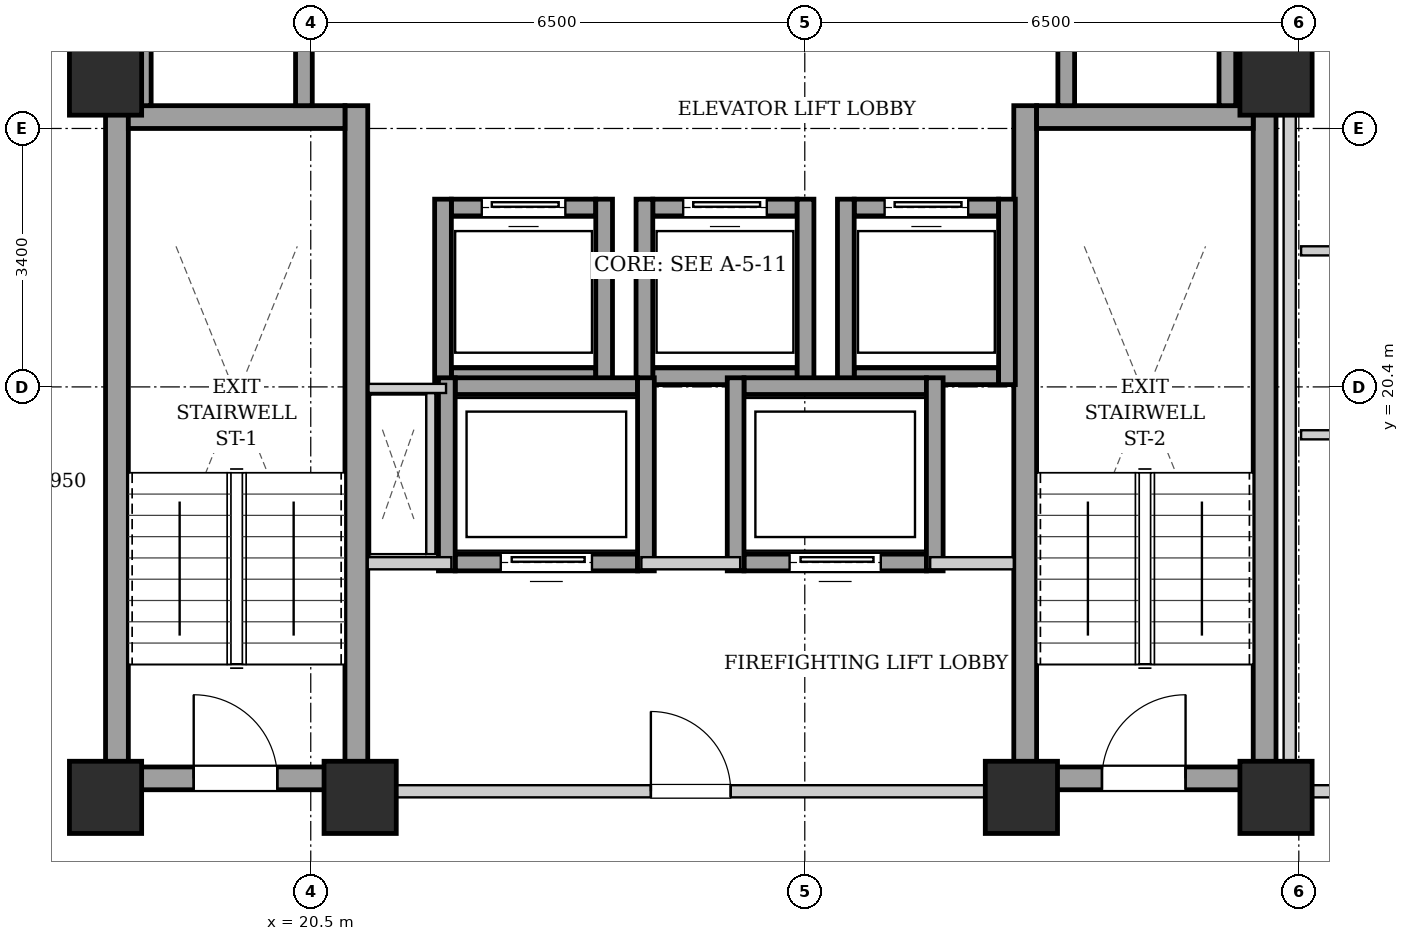
"""IFC4 building model, lengths in metres.
Left out: names, types, materials, properties, quantities, classifications, styles, units other than length and angle.
Written with IfcOpenShell. Run it as: python <this file> out.ifc"""

import sys

from ifc_helpers import new_model, si_unit, direction, frame, frame_2d, origin, origin_2d, place, context, subcontext, project, spatial, rectangle, extrude, element, fill, save


model = new_model("IFC4")
c1 = context("Model", 3, precision=1e-05, world=origin(), true_north=direction((0.0, 1.0)))
c2 = subcontext(c1, "Body", "Model", "MODEL_VIEW")
j1 = project(units=[si_unit("LENGTHUNIT", "METRE"), si_unit("PLANEANGLEUNIT", "RADIAN")], contexts=[c1])
p1 = place(None, origin())
s1 = spatial("IfcSite", under=j1, at=p1, CompositionType="ELEMENT")
p2 = place(p1, origin())
s2 = spatial("IfcBuilding", under=s1, at=p2, CompositionType="ELEMENT")
p3 = place(p2, frame((0.0, 0.0, 130.9)))
s3 = spatial("IfcBuildingStorey", under=s2, at=p3, CompositionType="ELEMENT", Elevation=130.9)
for number, where, z_axis, x_axis in (
    (1, (17.8, 15.0, 0.0), (0.0, 0.0, 1.0), (1.0, 0.0, 0.0)),
    (2, (21.15, 15.0, 0.0), (0.0, 0.0, 1.0), (1.0, 0.0, 0.0)),
    (3, (29.85, 15.0, 0.0), (0.0, 0.0, 1.0), (1.0, 0.0, 0.0)),
    (4, (33.2, 15.0, 0.0), (0.0, 0.0, 1.0), (1.0, 0.0, 0.0)),
    (5, (17.8, 24.45, 0.0), (0.0, 0.0, 1.0), (1.0, 0.0, 0.0)),
    (6, (33.2, 24.45, 0.0), (0.0, 0.0, 1.0), (1.0, 0.0, 0.0)),
):
    element("IfcColumn", number, at=place(p3, frame(where, z_axis=z_axis, x_axis=x_axis)), inside=s3, PredefinedType="COLUMN", context=c2, shape_type="SweptSolid", body=[
        extrude(rectangle(XDim=0.95, YDim=0.95, at=origin_2d()), origin(), (0.0, 0.0, 1.0), 3.25),
    ])
for number, where, z_axis, x_axis in (
    (7, (17.95, 15.1, 0.0), (0.0, 0.0, 1.0), (0.0, 1.0, 0.0)),
    (8, (21.1, 15.1, 0.0), (0.0, 0.0, 1.0), (0.0, 1.0, 0.0)),
):
    element("IfcWall", number, at=place(p3, frame(where, z_axis=z_axis, x_axis=x_axis)), inside=s3, PredefinedType="SHEAR", context=c2, shape_type="SweptSolid", body=[
        extrude(rectangle(XDim=9.0, YDim=0.3, at=frame_2d((4.5, 0.0))), origin(), (0.0, 0.0, 1.0), 2.99),
    ])
p4 = place(p3, frame((18.1, 23.95, 0.0), z_axis=(0.0, 0.0, 1.0), x_axis=(1.0, 0.0, 0.0)))
e9 = element("IfcWall", 9, at=p4, inside=s3, PredefinedType="SHEAR", context=c2, shape_type="SweptSolid", body=[
    extrude(rectangle(XDim=2.85, YDim=0.3, at=frame_2d((1.425, 0.0))), origin(), (0.0, 0.0, 1.0), 2.99),
])
p5 = place(p3, frame((18.1, 15.25, 0.0), z_axis=(0.0, 0.0, 1.0), x_axis=(1.0, 0.0, 0.0)))
e10 = element("IfcWall", 10, at=p5, inside=s3, PredefinedType="SHEAR", context=c2, shape_type="SweptSolid", body=[
    extrude(rectangle(XDim=2.85, YDim=0.3, at=frame_2d((1.425, 0.0))), origin(), (0.0, 0.0, 1.0), 2.99),
])
p6 = place(p5, frame((0.86, 0.0, 0.0)))
e11 = element("IfcOpeningElement", 11, at=p6, cuts=e10, PredefinedType="OPENING", context=c2, shape_type="SweptSolid", body=[
    extrude(rectangle(XDim=1.1, YDim=2.05, at=frame_2d((0.55, 1.025))), frame((0.0, 0.16, 0.0), z_axis=(0.0, -1.0, 0.0), x_axis=(1.0, 0.0, 0.0)), (0.0, 0.0, 1.0), 0.32),
])
for number, where, z_axis, x_axis in (
    (12, (29.9, 15.1, 0.0), (0.0, 0.0, 1.0), (0.0, 1.0, 0.0)),
    (13, (33.05, 15.1, 0.0), (0.0, 0.0, 1.0), (0.0, 1.0, 0.0)),
):
    element("IfcWall", number, at=place(p3, frame(where, z_axis=z_axis, x_axis=x_axis)), inside=s3, PredefinedType="SHEAR", context=c2, shape_type="SweptSolid", body=[
        extrude(rectangle(XDim=9.0, YDim=0.3, at=frame_2d((4.5, 0.0))), origin(), (0.0, 0.0, 1.0), 2.99),
    ])
p7 = place(p3, frame((30.05, 23.95, 0.0), z_axis=(0.0, 0.0, 1.0), x_axis=(1.0, 0.0, 0.0)))
e14 = element("IfcWall", 14, at=p7, inside=s3, PredefinedType="SHEAR", context=c2, shape_type="SweptSolid", body=[
    extrude(rectangle(XDim=2.85, YDim=0.3, at=frame_2d((1.425, 0.0))), origin(), (0.0, 0.0, 1.0), 2.99),
])
p8 = place(p3, frame((30.05, 15.25, 0.0), z_axis=(0.0, 0.0, 1.0), x_axis=(1.0, 0.0, 0.0)))
e15 = element("IfcWall", 15, at=p8, inside=s3, PredefinedType="SHEAR", context=c2, shape_type="SweptSolid", body=[
    extrude(rectangle(XDim=2.85, YDim=0.3, at=frame_2d((1.425, 0.0))), origin(), (0.0, 0.0, 1.0), 2.99),
])
p9 = place(p8, frame((0.86, 0.0, 0.0)))
e16 = element("IfcOpeningElement", 16, at=p9, cuts=e15, PredefinedType="OPENING", context=c2, shape_type="SweptSolid", body=[
    extrude(rectangle(XDim=1.1, YDim=2.05, at=frame_2d((0.55, 1.025))), frame((0.0, 0.16, 0.0), z_axis=(0.0, -1.0, 0.0), x_axis=(1.0, 0.0, 0.0)), (0.0, 0.0, 1.0), 0.32),
])
p10 = place(p3, frame((22.35, 20.54, 0.0), z_axis=(0.0, 0.0, 1.0), x_axis=(1.0, 0.0, 0.0)))
e17 = element("IfcWall", 17, at=p10, inside=s3, PredefinedType="SHEAR", context=c2, shape_type="SweptSolid", body=[
    extrude(rectangle(XDim=1.9, YDim=0.22, at=frame_2d((0.95, 0.0))), origin(), (0.0, 0.0, 1.0), 2.99),
])
p11 = place(p3, frame((22.35, 22.76, 0.0), z_axis=(0.0, 0.0, 1.0), x_axis=(1.0, 0.0, 0.0)))
e18 = element("IfcWall", 18, at=p11, inside=s3, PredefinedType="SHEAR", context=c2, shape_type="SweptSolid", body=[
    extrude(rectangle(XDim=1.9, YDim=0.22, at=frame_2d((0.95, 0.0))), origin(), (0.0, 0.0, 1.0), 2.99),
])
p12 = place(p11, frame((0.4, 0.0, 0.0)))
e19 = element("IfcOpeningElement", 19, at=p12, cuts=e18, PredefinedType="OPENING", context=c2, shape_type="SweptSolid", body=[
    extrude(rectangle(XDim=1.1, YDim=2.15, at=frame_2d((0.55, 1.075))), frame((0.0, 0.12, 0.0), z_axis=(0.0, -1.0, 0.0), x_axis=(1.0, 0.0, 0.0)), (0.0, 0.0, 1.0), 0.24),
])
for number, where, z_axis, x_axis in (
    (20, (22.24, 20.43, 0.0), (0.0, 0.0, 1.0), (0.0, 1.0, 0.0)),
    (21, (24.36, 20.43, 0.0), (0.0, 0.0, 1.0), (0.0, 1.0, 0.0)),
):
    element("IfcWall", number, at=place(p3, frame(where, z_axis=z_axis, x_axis=x_axis)), inside=s3, PredefinedType="SHEAR", context=c2, shape_type="SweptSolid", body=[
        extrude(rectangle(XDim=2.44, YDim=0.22, at=frame_2d((1.22, 0.0))), origin(), (0.0, 0.0, 1.0), 2.99),
    ])
p13 = place(p3, frame((25.0, 20.54, 0.0), z_axis=(0.0, 0.0, 1.0), x_axis=(1.0, 0.0, 0.0)))
e22 = element("IfcWall", 22, at=p13, inside=s3, PredefinedType="SHEAR", context=c2, shape_type="SweptSolid", body=[
    extrude(rectangle(XDim=1.9, YDim=0.22, at=frame_2d((0.95, 0.0))), origin(), (0.0, 0.0, 1.0), 2.99),
])
p14 = place(p3, frame((25.0, 22.76, 0.0), z_axis=(0.0, 0.0, 1.0), x_axis=(1.0, 0.0, 0.0)))
e23 = element("IfcWall", 23, at=p14, inside=s3, PredefinedType="SHEAR", context=c2, shape_type="SweptSolid", body=[
    extrude(rectangle(XDim=1.9, YDim=0.22, at=frame_2d((0.95, 0.0))), origin(), (0.0, 0.0, 1.0), 2.99),
])
p15 = place(p14, frame((0.4, 0.0, 0.0)))
e24 = element("IfcOpeningElement", 24, at=p15, cuts=e23, PredefinedType="OPENING", context=c2, shape_type="SweptSolid", body=[
    extrude(rectangle(XDim=1.1, YDim=2.15, at=frame_2d((0.55, 1.075))), frame((0.0, 0.12, 0.0), z_axis=(0.0, -1.0, 0.0), x_axis=(1.0, 0.0, 0.0)), (0.0, 0.0, 1.0), 0.24),
])
for number, where, z_axis, x_axis in (
    (25, (24.89, 20.43, 0.0), (0.0, 0.0, 1.0), (0.0, 1.0, 0.0)),
    (26, (27.01, 20.43, 0.0), (0.0, 0.0, 1.0), (0.0, 1.0, 0.0)),
):
    element("IfcWall", number, at=place(p3, frame(where, z_axis=z_axis, x_axis=x_axis)), inside=s3, PredefinedType="SHEAR", context=c2, shape_type="SweptSolid", body=[
        extrude(rectangle(XDim=2.44, YDim=0.22, at=frame_2d((1.22, 0.0))), origin(), (0.0, 0.0, 1.0), 2.99),
    ])
p16 = place(p3, frame((27.65, 20.54, 0.0), z_axis=(0.0, 0.0, 1.0), x_axis=(1.0, 0.0, 0.0)))
e27 = element("IfcWall", 27, at=p16, inside=s3, PredefinedType="SHEAR", context=c2, shape_type="SweptSolid", body=[
    extrude(rectangle(XDim=1.9, YDim=0.22, at=frame_2d((0.95, 0.0))), origin(), (0.0, 0.0, 1.0), 2.99),
])
p17 = place(p3, frame((27.65, 22.76, 0.0), z_axis=(0.0, 0.0, 1.0), x_axis=(1.0, 0.0, 0.0)))
e28 = element("IfcWall", 28, at=p17, inside=s3, PredefinedType="SHEAR", context=c2, shape_type="SweptSolid", body=[
    extrude(rectangle(XDim=1.9, YDim=0.22, at=frame_2d((0.95, 0.0))), origin(), (0.0, 0.0, 1.0), 2.99),
])
p18 = place(p17, frame((0.4, 0.0, 0.0)))
e29 = element("IfcOpeningElement", 29, at=p18, cuts=e28, PredefinedType="OPENING", context=c2, shape_type="SweptSolid", body=[
    extrude(rectangle(XDim=1.1, YDim=2.15, at=frame_2d((0.55, 1.075))), frame((0.0, 0.12, 0.0), z_axis=(0.0, -1.0, 0.0), x_axis=(1.0, 0.0, 0.0)), (0.0, 0.0, 1.0), 0.24),
])
for number, where, z_axis, x_axis in (
    (30, (27.54, 20.43, 0.0), (0.0, 0.0, 1.0), (0.0, 1.0, 0.0)),
    (31, (29.66, 20.43, 0.0), (0.0, 0.0, 1.0), (0.0, 1.0, 0.0)),
):
    element("IfcWall", number, at=place(p3, frame(where, z_axis=z_axis, x_axis=x_axis)), inside=s3, PredefinedType="SHEAR", context=c2, shape_type="SweptSolid", body=[
        extrude(rectangle(XDim=2.44, YDim=0.22, at=frame_2d((1.22, 0.0))), origin(), (0.0, 0.0, 1.0), 2.99),
    ])
p19 = place(p3, frame((18.29, 24.1, 0.0), z_axis=(0.0, 0.0, 1.0), x_axis=(0.0, 1.0, 0.0)))
e32 = element("IfcWall", 32, at=p19, inside=s3, PredefinedType="SHEAR", context=c2, shape_type="SweptSolid", body=[
    extrude(rectangle(XDim=4.14, YDim=0.22, at=frame_2d((2.07, 0.0))), origin(), (0.0, 0.0, 1.0), 2.99),
])
p20 = place(p3, frame((20.41, 24.1, 0.0), z_axis=(0.0, 0.0, 1.0), x_axis=(0.0, 1.0, 0.0)))
e33 = element("IfcWall", 33, at=p20, inside=s3, PredefinedType="SHEAR", context=c2, shape_type="SweptSolid", body=[
    extrude(rectangle(XDim=1.96, YDim=0.22, at=frame_2d((0.98, 0.0))), origin(), (0.0, 0.0, 1.0), 2.99),
])
for number, where, z_axis, x_axis in (
    (34, (30.44, 24.1, 0.0), (0.0, 0.0, 1.0), (0.0, 1.0, 0.0)),
    (35, (32.56, 24.1, 0.0), (0.0, 0.0, 1.0), (0.0, 1.0, 0.0)),
):
    element("IfcWall", number, at=place(p3, frame(where, z_axis=z_axis, x_axis=x_axis)), inside=s3, PredefinedType="SHEAR", context=c2, shape_type="SweptSolid", body=[
        extrude(rectangle(XDim=2.07, YDim=0.22, at=frame_2d((1.035, 0.0))), origin(), (0.0, 0.0, 1.0), 2.99),
    ])
p21 = place(p3, frame((22.4, 18.09, 0.0), z_axis=(0.0, 0.0, 1.0), x_axis=(1.0, 0.0, 0.0)))
e36 = element("IfcWall", 36, at=p21, inside=s3, PredefinedType="SHEAR", context=c2, shape_type="SweptSolid", body=[
    extrude(rectangle(XDim=2.4, YDim=0.22, at=frame_2d((1.2, 0.0))), origin(), (0.0, 0.0, 1.0), 2.99),
])
p22 = place(p21, frame((0.6, 0.0, 0.0)))
e37 = element("IfcOpeningElement", 37, at=p22, cuts=e36, PredefinedType="OPENING", context=c2, shape_type="SweptSolid", body=[
    extrude(rectangle(XDim=1.2, YDim=2.15, at=frame_2d((0.6, 1.075))), frame((0.0, 0.12, 0.0), z_axis=(0.0, -1.0, 0.0), x_axis=(1.0, 0.0, 0.0)), (0.0, 0.0, 1.0), 0.24),
])
p23 = place(p3, frame((22.4, 20.41, 0.0), z_axis=(0.0, 0.0, 1.0), x_axis=(1.0, 0.0, 0.0)))
e38 = element("IfcWall", 38, at=p23, inside=s3, PredefinedType="SHEAR", context=c2, shape_type="SweptSolid", body=[
    extrude(rectangle(XDim=2.4, YDim=0.22, at=frame_2d((1.2, 0.0))), origin(), (0.0, 0.0, 1.0), 2.99),
])
for number, where, z_axis, x_axis in (
    (39, (22.29, 17.98, 0.0), (0.0, 0.0, 1.0), (0.0, 1.0, 0.0)),
    (40, (24.91, 17.98, 0.0), (0.0, 0.0, 1.0), (0.0, 1.0, 0.0)),
):
    element("IfcWall", number, at=place(p3, frame(where, z_axis=z_axis, x_axis=x_axis)), inside=s3, PredefinedType="SHEAR", context=c2, shape_type="SweptSolid", body=[
        extrude(rectangle(XDim=2.54, YDim=0.22, at=frame_2d((1.27, 0.0))), origin(), (0.0, 0.0, 1.0), 2.99),
    ])
p24 = place(p3, frame((26.2, 18.09, 0.0), z_axis=(0.0, 0.0, 1.0), x_axis=(1.0, 0.0, 0.0)))
e41 = element("IfcWall", 41, at=p24, inside=s3, PredefinedType="SHEAR", context=c2, shape_type="SweptSolid", body=[
    extrude(rectangle(XDim=2.4, YDim=0.22, at=frame_2d((1.2, 0.0))), origin(), (0.0, 0.0, 1.0), 2.99),
])
p25 = place(p24, frame((0.6, 0.0, 0.0)))
e42 = element("IfcOpeningElement", 42, at=p25, cuts=e41, PredefinedType="OPENING", context=c2, shape_type="SweptSolid", body=[
    extrude(rectangle(XDim=1.2, YDim=2.15, at=frame_2d((0.6, 1.075))), frame((0.0, 0.12, 0.0), z_axis=(0.0, -1.0, 0.0), x_axis=(1.0, 0.0, 0.0)), (0.0, 0.0, 1.0), 0.24),
])
p26 = place(p3, frame((26.2, 20.41, 0.0), z_axis=(0.0, 0.0, 1.0), x_axis=(1.0, 0.0, 0.0)))
e43 = element("IfcWall", 43, at=p26, inside=s3, PredefinedType="SHEAR", context=c2, shape_type="SweptSolid", body=[
    extrude(rectangle(XDim=2.4, YDim=0.22, at=frame_2d((1.2, 0.0))), origin(), (0.0, 0.0, 1.0), 2.99),
])
for number, where, z_axis, x_axis in (
    (44, (26.09, 17.98, 0.0), (0.0, 0.0, 1.0), (0.0, 1.0, 0.0)),
    (45, (28.71, 17.98, 0.0), (0.0, 0.0, 1.0), (0.0, 1.0, 0.0)),
):
    element("IfcWall", number, at=place(p3, frame(where, z_axis=z_axis, x_axis=x_axis)), inside=s3, PredefinedType="SHEAR", context=c2, shape_type="SweptSolid", body=[
        extrude(rectangle(XDim=2.54, YDim=0.22, at=frame_2d((1.27, 0.0))), origin(), (0.0, 0.0, 1.0), 2.99),
    ])
p27 = place(p3, frame((21.25, 15.08, 0.0), z_axis=(0.0, 0.0, 1.0), x_axis=(1.0, 0.0, 0.0)))
e46 = element("IfcWall", 46, at=p27, inside=s3, PredefinedType="PARTITIONING", context=c2, shape_type="SweptSolid", body=[
    extrude(rectangle(XDim=8.5, YDim=0.16, at=frame_2d((4.25, 0.0))), origin(), (0.0, 0.0, 1.0), 2.426),
])
p28 = place(p27, frame((3.725, 0.0, 0.0)))
e47 = element("IfcOpeningElement", 47, at=p28, cuts=e46, PredefinedType="OPENING", context=c2, shape_type="SweptSolid", body=[
    extrude(rectangle(XDim=1.05, YDim=2.05, at=frame_2d((0.525, 1.025))), frame((0.0, 0.09, 0.0), z_axis=(0.0, -1.0, 0.0), x_axis=(1.0, 0.0, 0.0)), (0.0, 0.0, 1.0), 0.18),
])
p29 = place(p3, frame((21.25, 18.08, 0.0), z_axis=(0.0, 0.0, 1.0), x_axis=(1.0, 0.0, 0.0)))
e48 = element("IfcWall", 48, at=p29, inside=s3, PredefinedType="PARTITIONING", context=c2, shape_type="SweptSolid", body=[
    extrude(rectangle(XDim=1.1, YDim=0.16, at=frame_2d((0.55, 0.0))), origin(), (0.0, 0.0, 1.0), 2.99),
])
p30 = place(p3, frame((24.85, 18.08, 0.0), z_axis=(0.0, 0.0, 1.0), x_axis=(1.0, 0.0, 0.0)))
e49 = element("IfcWall", 49, at=p30, inside=s3, PredefinedType="PARTITIONING", context=c2, shape_type="SweptSolid", body=[
    extrude(rectangle(XDim=1.3, YDim=0.16, at=frame_2d((0.65, 0.0))), origin(), (0.0, 0.0, 1.0), 2.99),
])
p31 = place(p3, frame((28.65, 18.08, 0.0), z_axis=(0.0, 0.0, 1.0), x_axis=(1.0, 0.0, 0.0)))
e50 = element("IfcWall", 50, at=p31, inside=s3, PredefinedType="PARTITIONING", context=c2, shape_type="SweptSolid", body=[
    extrude(rectangle(XDim=1.1, YDim=0.16, at=frame_2d((0.55, 0.0))), origin(), (0.0, 0.0, 1.0), 2.99),
])
for number, where, z_axis, x_axis in (
    (51, (17.88, 24.12, 0.0), (0.0, 0.0, 1.0), (0.0, 1.0, 0.0)),
    (52, (33.12, 24.12, 0.0), (0.0, 0.0, 1.0), (0.0, 1.0, 0.0)),
):
    element("IfcWall", number, at=place(p3, frame(where, z_axis=z_axis, x_axis=x_axis)), inside=s3, PredefinedType="PARTITIONING", context=c2, shape_type="SweptSolid", body=[
        extrude(rectangle(XDim=4.76, YDim=0.16, at=frame_2d((2.38, 0.0))), origin(), (0.0, 0.0, 1.0), 2.99),
    ])
p32 = place(p3, frame((22.08, 18.2, 0.0), z_axis=(0.0, 0.0, 1.0), x_axis=(0.0, 1.0, 0.0)))
e53 = element("IfcWall", 53, at=p32, inside=s3, PredefinedType="PARTITIONING", context=c2, shape_type="SweptSolid", body=[
    extrude(rectangle(XDim=2.12, YDim=0.12, at=frame_2d((1.06, 0.0))), origin(), (0.0, 0.0, 1.0), 2.99),
])
p33 = place(p3, frame((22.28, 20.38, 0.0), z_axis=(0.0, 0.0, 1.0), x_axis=(-1.0, 0.0, 0.0)))
e54 = element("IfcWall", 54, at=p33, inside=s3, PredefinedType="PARTITIONING", context=c2, shape_type="SweptSolid", body=[
    extrude(rectangle(XDim=1.02, YDim=0.12, at=frame_2d((0.51, 0.0))), origin(), (0.0, 0.0, 1.0), 2.99),
])
p34 = place(p3, frame((33.38, 15.08, 0.0), z_axis=(0.0, 0.0, 1.0), x_axis=(1.0, 0.0, 0.0)))
e55 = element("IfcWall", 55, at=p34, inside=s3, PredefinedType="PARTITIONING", context=c2, shape_type="SweptSolid", body=[
    extrude(rectangle(XDim=6.64, YDim=0.16, at=frame_2d((3.32, 0.0))), origin(), (0.0, 0.0, 1.0), 2.426),
])
p35 = place(p34, frame((0.9, 0.0, 0.0)))
e56 = element("IfcOpeningElement", 56, at=p35, cuts=e55, PredefinedType="OPENING", context=c2, shape_type="SweptSolid", body=[
    extrude(rectangle(XDim=0.95, YDim=2.1, at=frame_2d((0.475, 1.05))), frame((0.0, 0.09, 0.0), z_axis=(0.0, -1.0, 0.0), x_axis=(1.0, 0.0, 0.0)), (0.0, 0.0, 1.0), 0.18),
])
p36 = place(p3, frame((33.53, 22.19, 0.0), z_axis=(0.0, 0.0, 1.0), x_axis=(1.0, 0.0, 0.0)))
e57 = element("IfcWall", 57, at=p36, inside=s3, PredefinedType="PARTITIONING", context=c2, shape_type="SweptSolid", body=[
    extrude(rectangle(XDim=2.45, YDim=0.12, at=frame_2d((1.225, 0.0))), origin(), (0.0, 0.0, 1.0), 2.99),
])
p37 = place(p3, frame((33.53, 19.77, 0.0), z_axis=(0.0, 0.0, 1.0), x_axis=(1.0, 0.0, 0.0)))
e58 = element("IfcWall", 58, at=p37, inside=s3, PredefinedType="PARTITIONING", context=c2, shape_type="SweptSolid", body=[
    extrude(rectangle(XDim=2.45, YDim=0.12, at=frame_2d((1.225, 0.0))), origin(), (0.0, 0.0, 1.0), 2.99),
])
p38 = place(p37, frame((0.795, 0.0, 0.0)))
e59 = element("IfcOpeningElement", 59, at=p38, cuts=e58, PredefinedType="OPENING", context=c2, shape_type="SweptSolid", body=[
    extrude(rectangle(XDim=0.86, YDim=2.05, at=frame_2d((0.43, 1.025))), frame((0.0, 0.07, 0.0), z_axis=(0.0, -1.0, 0.0), x_axis=(1.0, 0.0, 0.0)), (0.0, 0.0, 1.0), 0.14),
])
p39 = place(p3, frame((33.38, 15.02, 0.0), z_axis=(0.0, 0.0, 1.0), x_axis=(0.0, 1.0, 0.0)))
e60 = element("IfcWall", 60, at=p39, inside=s3, PredefinedType="PARTITIONING", context=c2, shape_type="SweptSolid", body=[
    extrude(rectangle(XDim=13.98, YDim=0.16, at=frame_2d((6.99, 0.0))), origin(), (0.0, 0.0, 1.0), 2.99),
])
p40 = place(p6, origin())
e61 = element("IfcDoor", 61, at=p40, inside=s3, OperationType="SINGLE_SWING_LEFT", PredefinedType="DOOR", context=c2, shape_type="SweptSolid", body=[
    extrude(rectangle(XDim=1.1, YDim=2.05, at=frame_2d((0.55, 1.025))), frame((0.0, 0.025, 0.0), z_axis=(0.0, -1.0, 0.0), x_axis=(1.0, 0.0, 0.0)), (0.0, 0.0, 1.0), 0.05),
])
fill(e11, e61)
p41 = place(p9, origin())
e62 = element("IfcDoor", 62, at=p41, inside=s3, OperationType="SINGLE_SWING_RIGHT", PredefinedType="DOOR", context=c2, shape_type="SweptSolid", body=[
    extrude(rectangle(XDim=1.1, YDim=2.05, at=frame_2d((0.55, 1.025))), frame((0.0, 0.025, 0.0), z_axis=(0.0, -1.0, 0.0), x_axis=(1.0, 0.0, 0.0)), (0.0, 0.0, 1.0), 0.05),
])
fill(e16, e62)
p42 = place(p12, origin())
e63 = element("IfcDoor", 63, at=p42, inside=s3, OperationType="SLIDING_TO_LEFT", PredefinedType="DOOR", context=c2, shape_type="SweptSolid", body=[
    extrude(rectangle(XDim=1.1, YDim=2.15, at=frame_2d((0.55, 1.075))), frame((0.0, 0.025, 0.0), z_axis=(0.0, -1.0, 0.0), x_axis=(1.0, 0.0, 0.0)), (0.0, 0.0, 1.0), 0.05),
])
fill(e19, e63)
p43 = place(p15, origin())
e64 = element("IfcDoor", 64, at=p43, inside=s3, OperationType="SLIDING_TO_LEFT", PredefinedType="DOOR", context=c2, shape_type="SweptSolid", body=[
    extrude(rectangle(XDim=1.1, YDim=2.15, at=frame_2d((0.55, 1.075))), frame((0.0, 0.025, 0.0), z_axis=(0.0, -1.0, 0.0), x_axis=(1.0, 0.0, 0.0)), (0.0, 0.0, 1.0), 0.05),
])
fill(e24, e64)
p44 = place(p18, origin())
e65 = element("IfcDoor", 65, at=p44, inside=s3, OperationType="SLIDING_TO_LEFT", PredefinedType="DOOR", context=c2, shape_type="SweptSolid", body=[
    extrude(rectangle(XDim=1.1, YDim=2.15, at=frame_2d((0.55, 1.075))), frame((0.0, 0.025, 0.0), z_axis=(0.0, -1.0, 0.0), x_axis=(1.0, 0.0, 0.0)), (0.0, 0.0, 1.0), 0.05),
])
fill(e29, e65)
p45 = place(p22, origin())
e66 = element("IfcDoor", 66, at=p45, inside=s3, OperationType="SLIDING_TO_LEFT", PredefinedType="DOOR", context=c2, shape_type="SweptSolid", body=[
    extrude(rectangle(XDim=1.2, YDim=2.15, at=frame_2d((0.6, 1.075))), frame((0.0, 0.025, 0.0), z_axis=(0.0, -1.0, 0.0), x_axis=(1.0, 0.0, 0.0)), (0.0, 0.0, 1.0), 0.05),
])
fill(e37, e66)
p46 = place(p25, origin())
e67 = element("IfcDoor", 67, at=p46, inside=s3, OperationType="SLIDING_TO_LEFT", PredefinedType="DOOR", context=c2, shape_type="SweptSolid", body=[
    extrude(rectangle(XDim=1.2, YDim=2.15, at=frame_2d((0.6, 1.075))), frame((0.0, 0.025, 0.0), z_axis=(0.0, -1.0, 0.0), x_axis=(1.0, 0.0, 0.0)), (0.0, 0.0, 1.0), 0.05),
])
fill(e42, e67)
p47 = place(p28, origin())
e68 = element("IfcDoor", 68, at=p47, inside=s3, OperationType="SINGLE_SWING_LEFT", PredefinedType="DOOR", context=c2, shape_type="SweptSolid", body=[
    extrude(rectangle(XDim=1.05, YDim=2.05, at=frame_2d((0.525, 1.025))), frame((0.0, 0.025, 0.0), z_axis=(0.0, -1.0, 0.0), x_axis=(1.0, 0.0, 0.0)), (0.0, 0.0, 1.0), 0.05),
])
fill(e47, e68)
save(model, sys.argv[1])
